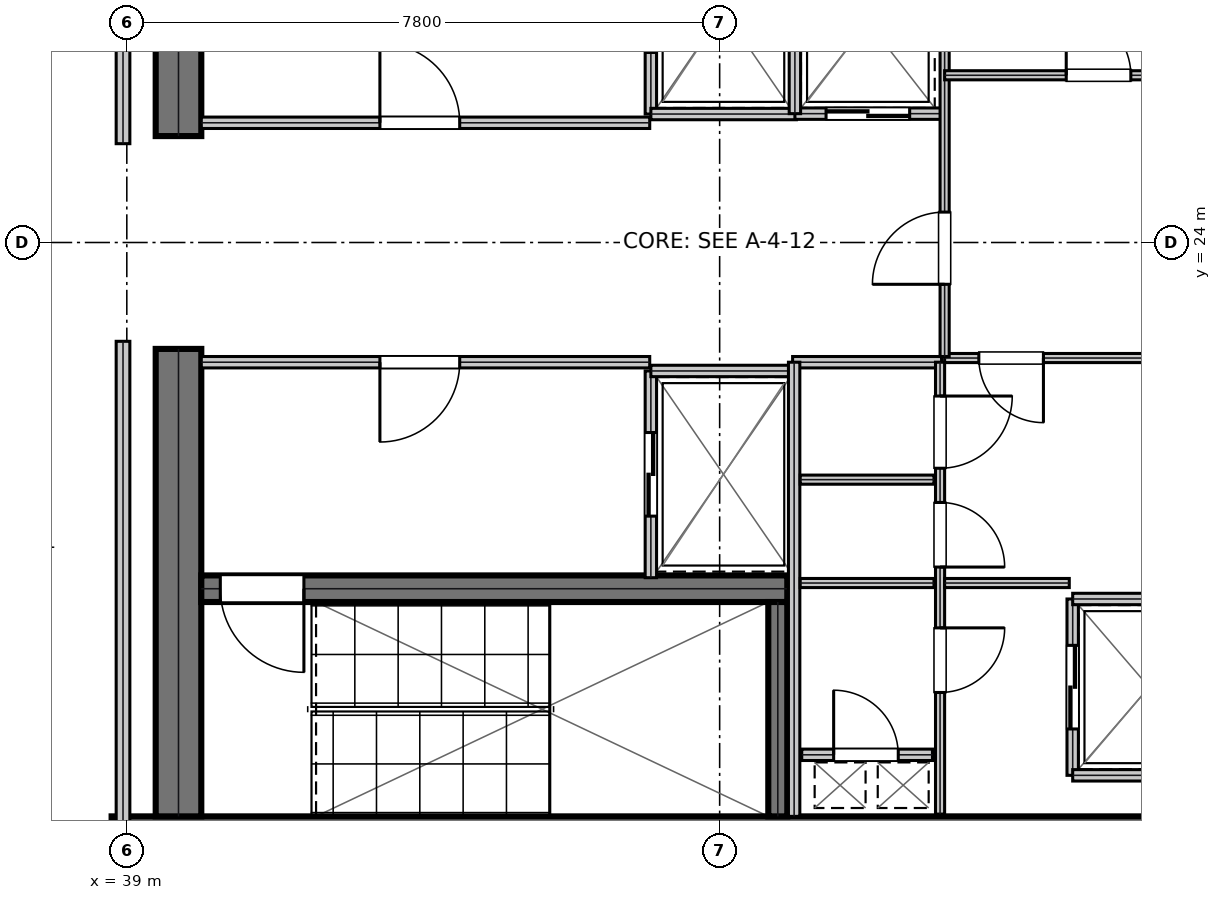
"""IFC4 building model, lengths in metres.
Left out: names, types, materials, properties, quantities, classifications, styles, units other than length and angle.
Written with IfcOpenShell. Run it as: python <this file> out.ifc"""

import sys

from ifc_helpers import new_model, si_unit, direction, frame, frame_2d, origin, place, context, subcontext, project, spatial, rectangle, extrude, element, fill, save


model = new_model("IFC4")
c1 = context("Model", 3, precision=1e-05, world=origin(), true_north=direction((0.0, 1.0)))
c2 = subcontext(c1, "Body", "Model", "MODEL_VIEW")
j1 = project(units=[si_unit("LENGTHUNIT", "METRE"), si_unit("PLANEANGLEUNIT", "RADIAN")], contexts=[c1])
p1 = place(None, origin())
s1 = spatial("IfcSite", under=j1, at=p1, CompositionType="ELEMENT")
p2 = place(p1, origin())
s2 = spatial("IfcBuilding", under=s1, at=p2, CompositionType="ELEMENT")
p3 = place(p2, frame((0.0, 0.0, 295.2)))
s3 = spatial("IfcBuildingStorey", under=s2, at=p3, CompositionType="ELEMENT", Elevation=295.2)
p4 = place(p3, frame((38.8, 16.15, 0.0), z_axis=(0.0, 0.0, 1.0), x_axis=(1.0, 0.0, 0.0)))
e1 = element("IfcWall", 1, at=p4, inside=s3, PredefinedType="SHEAR", context=c2, shape_type="SweptSolid", body=[
    extrude(rectangle(XDim=16.0, YDim=0.6, at=frame_2d((8.0, 0.0))), origin(), (0.0, 0.0, 1.0), 3.81),
])
for number, where, z_axis, x_axis in (
    (2, (39.68, 16.45, 0.0), (0.0, 0.0, 1.0), (0.0, 1.0, 0.0)),
    (3, (39.68, 25.4, 0.0), (0.0, 0.0, 1.0), (0.0, 1.0, 0.0)),
):
    element("IfcWall", number, at=place(p3, frame(where, z_axis=z_axis, x_axis=x_axis)), inside=s3, PredefinedType="SHEAR", context=c2, shape_type="SweptSolid", body=[
        extrude(rectangle(XDim=6.15, YDim=0.6, at=frame_2d((3.075, 0.0))), origin(), (0.0, 0.0, 1.0), 3.81),
    ])
p5 = place(p3, frame((39.98, 19.445, 0.0), z_axis=(0.0, 0.0, 1.0), x_axis=(1.0, 0.0, 0.0)))
e4 = element("IfcWall", 4, at=p5, inside=s3, PredefinedType="SHEAR", context=c2, shape_type="SweptSolid", body=[
    extrude(rectangle(XDim=7.71, YDim=0.35, at=frame_2d((3.855, 0.0))), origin(), (0.0, 0.0, 1.0), 3.81),
])
p6 = place(p5, frame((0.25, 0.0, 0.0)))
e5 = element("IfcOpeningElement", 5, at=p6, cuts=e4, PredefinedType="OPENING", context=c2, shape_type="SweptSolid", body=[
    extrude(rectangle(XDim=1.1, YDim=2.15, at=frame_2d((0.55, 1.075))), frame((0.0, 0.185, 0.0), z_axis=(0.0, -1.0, 0.0), x_axis=(1.0, 0.0, 0.0)), (0.0, 0.0, 1.0), 0.37),
])
p7 = place(p3, frame((47.565, 16.45, 0.0), z_axis=(0.0, 0.0, 1.0), x_axis=(0.0, 1.0, 0.0)))
e6 = element("IfcWall", 6, at=p7, inside=s3, PredefinedType="SHEAR", context=c2, shape_type="SweptSolid", body=[
    extrude(rectangle(XDim=2.82, YDim=0.25, at=frame_2d((1.41, 0.0))), origin(), (0.0, 0.0, 1.0), 3.81),
])
p8 = place(p3, frame((39.98, 25.575, 0.0), z_axis=(0.0, 0.0, 1.0), x_axis=(1.0, 0.0, 0.0)))
e7 = element("IfcWall", 7, at=p8, inside=s3, PredefinedType="PARTITIONING", context=c2, shape_type="SweptSolid", body=[
    extrude(rectangle(XDim=5.9, YDim=0.15, at=frame_2d((2.95, 0.0))), origin(), (0.0, 0.0, 1.0), 3.81),
])
p9 = place(p8, frame((2.35, 0.0, 0.0)))
e8 = element("IfcOpeningElement", 8, at=p9, cuts=e7, PredefinedType="OPENING", context=c2, shape_type="SweptSolid", body=[
    extrude(rectangle(XDim=1.05, YDim=2.15, at=frame_2d((0.525, 1.075))), frame((0.0, 0.085, 0.0), z_axis=(0.0, -1.0, 0.0), x_axis=(1.0, 0.0, 0.0)), (0.0, 0.0, 1.0), 0.17),
])
p10 = place(p3, frame((39.98, 22.425, 0.0), z_axis=(0.0, 0.0, 1.0), x_axis=(1.0, 0.0, 0.0)))
e9 = element("IfcWall", 9, at=p10, inside=s3, PredefinedType="PARTITIONING", context=c2, shape_type="SweptSolid", body=[
    extrude(rectangle(XDim=5.9, YDim=0.15, at=frame_2d((2.95, 0.0))), origin(), (0.0, 0.0, 1.0), 3.81),
])
p11 = place(p10, frame((2.35, 0.0, 0.0)))
e10 = element("IfcOpeningElement", 10, at=p11, cuts=e9, PredefinedType="OPENING", context=c2, shape_type="SweptSolid", body=[
    extrude(rectangle(XDim=1.05, YDim=2.15, at=frame_2d((0.525, 1.075))), frame((0.0, 0.085, 0.0), z_axis=(0.0, -1.0, 0.0), x_axis=(1.0, 0.0, 0.0)), (0.0, 0.0, 1.0), 0.17),
])
p12 = place(p3, frame((45.895, 25.69, 0.0), z_axis=(0.0, 0.0, 1.0), x_axis=(0.0, 1.0, 0.0)))
e11 = element("IfcWall", 11, at=p12, inside=s3, PredefinedType="PARTITIONING", context=c2, shape_type="SweptSolid", body=[
    extrude(rectangle(XDim=2.72, YDim=0.15, at=frame_2d((1.36, 0.0))), origin(), (0.0, 0.0, 1.0), 3.81),
])
p13 = place(p12, frame((0.81, 0.0, 0.0)))
e12 = element("IfcOpeningElement", 12, at=p13, cuts=e11, PredefinedType="OPENING", context=c2, shape_type="SweptSolid", body=[
    extrude(rectangle(XDim=1.1, YDim=2.15, at=frame_2d((0.55, 1.075))), frame((0.0, 0.085, 0.0), z_axis=(0.0, -1.0, 0.0), x_axis=(1.0, 0.0, 0.0)), (0.0, 0.0, 1.0), 0.17),
])
p14 = place(p3, frame((45.895, 25.69, 0.0), z_axis=(0.0, 0.0, 1.0), x_axis=(1.0, 0.0, 0.0)))
e13 = element("IfcWall", 13, at=p14, inside=s3, PredefinedType="PARTITIONING", context=c2, shape_type="SweptSolid", body=[
    extrude(rectangle(XDim=1.915, YDim=0.15, at=frame_2d((0.958, 0.0))), origin(), (0.0, 0.0, 1.0), 3.81),
])
p15 = place(p3, frame((45.895, 19.59, 0.0), z_axis=(0.0, 0.0, 1.0), x_axis=(0.0, 1.0, 0.0)))
e14 = element("IfcWall", 14, at=p15, inside=s3, PredefinedType="PARTITIONING", context=c2, shape_type="SweptSolid", body=[
    extrude(rectangle(XDim=2.72, YDim=0.15, at=frame_2d((1.36, 0.0))), origin(), (0.0, 0.0, 1.0), 3.81),
])
p16 = place(p15, frame((0.81, 0.0, 0.0)))
e15 = element("IfcOpeningElement", 15, at=p16, cuts=e14, PredefinedType="OPENING", context=c2, shape_type="SweptSolid", body=[
    extrude(rectangle(XDim=1.1, YDim=2.15, at=frame_2d((0.55, 1.075))), frame((0.0, 0.085, 0.0), z_axis=(0.0, -1.0, 0.0), x_axis=(1.0, 0.0, 0.0)), (0.0, 0.0, 1.0), 0.17),
])
p17 = place(p3, frame((45.895, 22.31, 0.0), z_axis=(0.0, 0.0, 1.0), x_axis=(1.0, 0.0, 0.0)))
e16 = element("IfcWall", 16, at=p17, inside=s3, PredefinedType="PARTITIONING", context=c2, shape_type="SweptSolid", body=[
    extrude(rectangle(XDim=1.915, YDim=0.15, at=frame_2d((0.958, 0.0))), origin(), (0.0, 0.0, 1.0), 3.81),
])
p18 = place(p3, frame((47.79, 25.695, 0.0), z_axis=(0.0, 0.0, 1.0), x_axis=(1.0, 0.0, 0.0)))
e17 = element("IfcWall", 17, at=p18, inside=s3, PredefinedType="PARTITIONING", context=c2, shape_type="SweptSolid", body=[
    extrude(rectangle(XDim=1.92, YDim=0.15, at=frame_2d((0.96, 0.0))), origin(), (0.0, 0.0, 1.0), 3.81),
])
p19 = place(p18, frame((0.41, 0.0, 0.0)))
e18 = element("IfcOpeningElement", 18, at=p19, cuts=e17, PredefinedType="OPENING", context=c2, shape_type="SweptSolid", body=[
    extrude(rectangle(XDim=1.1, YDim=2.15, at=frame_2d((0.55, 1.075))), frame((0.0, 0.085, 0.0), z_axis=(0.0, -1.0, 0.0), x_axis=(1.0, 0.0, 0.0)), (0.0, 0.0, 1.0), 0.17),
])
p20 = place(p3, frame((47.79, 25.695, 0.0), z_axis=(0.0, 0.0, 1.0), x_axis=(0.0, 1.0, 0.0)))
e19 = element("IfcWall", 19, at=p20, inside=s3, PredefinedType="PARTITIONING", context=c2, shape_type="SweptSolid", body=[
    extrude(rectangle(XDim=2.415, YDim=0.15, at=frame_2d((1.208, 0.0))), origin(), (0.0, 0.0, 1.0), 3.81),
])
p21 = place(p3, frame((51.445, 16.99, 0.0), z_axis=(0.0, 0.0, 1.0), x_axis=(0.0, 1.0, 0.0)))
e20 = element("IfcWall", 20, at=p21, inside=s3, PredefinedType="PARTITIONING", context=c2, shape_type="SweptSolid", body=[
    extrude(rectangle(XDim=2.32, YDim=0.15, at=frame_2d((1.16, 0.0))), origin(), (0.0, 0.0, 1.0), 3.81),
])
p22 = place(p21, frame((0.61, 0.0, 0.0)))
e21 = element("IfcOpeningElement", 21, at=p22, cuts=e20, PredefinedType="OPENING", context=c2, shape_type="SweptSolid", body=[
    extrude(rectangle(XDim=1.1, YDim=2.15, at=frame_2d((0.55, 1.075))), frame((0.0, 0.085, 0.0), z_axis=(0.0, -1.0, 0.0), x_axis=(1.0, 0.0, 0.0)), (0.0, 0.0, 1.0), 0.17),
])
for number, where, z_axis, x_axis in (
    (22, (51.445, 16.99, 0.0), (0.0, 0.0, 1.0), (1.0, 0.0, 0.0)),
    (23, (51.445, 19.31, 0.0), (0.0, 0.0, 1.0), (1.0, 0.0, 0.0)),
):
    element("IfcWall", number, at=place(p3, frame(where, z_axis=z_axis, x_axis=x_axis)), inside=s3, PredefinedType="PARTITIONING", context=c2, shape_type="SweptSolid", body=[
        extrude(rectangle(XDim=2.015, YDim=0.15, at=frame_2d((1.007, 0.0))), origin(), (0.0, 0.0, 1.0), 3.81),
    ])
p23 = place(p3, frame((47.88, 17.26, 0.0), z_axis=(0.0, 0.0, 1.0), x_axis=(1.0, 0.0, 0.0)))
e24 = element("IfcWall", 24, at=p23, inside=s3, PredefinedType="PARTITIONING", context=c2, shape_type="SweptSolid", body=[
    extrude(rectangle(XDim=1.72, YDim=0.15, at=frame_2d((0.86, 0.0))), origin(), (0.0, 0.0, 1.0), 3.81),
])
p24 = place(p23, frame((0.42, 0.0, 0.0)))
e25 = element("IfcOpeningElement", 25, at=p24, cuts=e24, PredefinedType="OPENING", context=c2, shape_type="SweptSolid", body=[
    extrude(rectangle(XDim=0.85, YDim=2.15, at=frame_2d((0.425, 1.075))), frame((0.0, 0.085, 0.0), z_axis=(0.0, -1.0, 0.0), x_axis=(1.0, 0.0, 0.0)), (0.0, 0.0, 1.0), 0.17),
])
p25 = place(p3, frame((47.76, 22.425, 0.0), z_axis=(0.0, 0.0, 1.0), x_axis=(1.0, 0.0, 0.0)))
e26 = element("IfcWall", 26, at=p25, inside=s3, PredefinedType="PARTITIONING", context=c2, shape_type="SweptSolid", body=[
    extrude(rectangle(XDim=1.96, YDim=0.15, at=frame_2d((0.98, 0.0))), origin(), (0.0, 0.0, 1.0), 3.81),
])
p26 = place(p3, frame((47.78, 16.45, 0.0), z_axis=(0.0, 0.0, 1.0), x_axis=(0.0, 1.0, 0.0)))
e27 = element("IfcWall", 27, at=p26, inside=s3, PredefinedType="PARTITIONING", context=c2, shape_type="SweptSolid", body=[
    extrude(rectangle(XDim=5.975, YDim=0.15, at=frame_2d((2.988, 0.0))), origin(), (0.0, 0.0, 1.0), 3.81),
])
for number, where, z_axis, x_axis in (
    (28, (47.86, 19.52, 0.0), (0.0, 0.0, 1.0), (1.0, 0.0, 0.0)),
    (29, (47.86, 20.88, 0.0), (0.0, 0.0, 1.0), (1.0, 0.0, 0.0)),
):
    element("IfcWall", number, at=place(p3, frame(where, z_axis=z_axis, x_axis=x_axis)), inside=s3, PredefinedType="PARTITIONING", context=c2, shape_type="SweptSolid", body=[
        extrude(rectangle(XDim=1.76, YDim=0.12, at=frame_2d((0.88, 0.0))), origin(), (0.0, 0.0, 1.0), 3.81),
    ])
p27 = place(p3, frame((49.7, 16.48, 0.0), z_axis=(0.0, 0.0, 1.0), x_axis=(0.0, 1.0, 0.0)))
e30 = element("IfcWall", 30, at=p27, inside=s3, PredefinedType="PARTITIONING", context=c2, shape_type="SweptSolid", body=[
    extrude(rectangle(XDim=5.945, YDim=0.12, at=frame_2d((2.973, 0.0))), origin(), (0.0, 0.0, 1.0), 3.81),
])
p28 = place(p27, frame((1.6, 0.0, 0.0)))
e31 = element("IfcOpeningElement", 31, at=p28, cuts=e30, PredefinedType="OPENING", context=c2, shape_type="SweptSolid", body=[
    extrude(rectangle(XDim=0.85, YDim=2.15, at=frame_2d((0.425, 1.075))), frame((0.0, 0.07, 0.0), z_axis=(0.0, -1.0, 0.0), x_axis=(1.0, 0.0, 0.0)), (0.0, 0.0, 1.0), 0.14),
])
p29 = place(p27, frame((3.25, 0.0, 0.0)))
e32 = element("IfcOpeningElement", 32, at=p29, cuts=e30, PredefinedType="OPENING", context=c2, shape_type="SweptSolid", body=[
    extrude(rectangle(XDim=0.85, YDim=2.15, at=frame_2d((0.425, 1.075))), frame((0.0, 0.07, 0.0), z_axis=(0.0, -1.0, 0.0), x_axis=(1.0, 0.0, 0.0)), (0.0, 0.0, 1.0), 0.14),
])
p30 = place(p27, frame((4.55, 0.0, 0.0)))
e33 = element("IfcOpeningElement", 33, at=p30, cuts=e30, PredefinedType="OPENING", context=c2, shape_type="SweptSolid", body=[
    extrude(rectangle(XDim=0.95, YDim=2.15, at=frame_2d((0.475, 1.075))), frame((0.0, 0.07, 0.0), z_axis=(0.0, -1.0, 0.0), x_axis=(1.0, 0.0, 0.0)), (0.0, 0.0, 1.0), 0.14),
])
p31 = place(p3, frame((49.76, 22.48, 0.0), z_axis=(0.0, 0.0, 1.0), x_axis=(1.0, 0.0, 0.0)))
e34 = element("IfcWall", 34, at=p31, inside=s3, PredefinedType="PARTITIONING", context=c2, shape_type="SweptSolid", body=[
    extrude(rectangle(XDim=3.9, YDim=0.12, at=frame_2d((1.95, 0.0))), origin(), (0.0, 0.0, 1.0), 3.81),
])
p32 = place(p31, frame((0.45, 0.0, 0.0)))
e35 = element("IfcOpeningElement", 35, at=p32, cuts=e34, PredefinedType="OPENING", context=c2, shape_type="SweptSolid", body=[
    extrude(rectangle(XDim=0.85, YDim=2.15, at=frame_2d((0.425, 1.075))), frame((0.0, 0.07, 0.0), z_axis=(0.0, -1.0, 0.0), x_axis=(1.0, 0.0, 0.0)), (0.0, 0.0, 1.0), 0.14),
])
p33 = place(p3, frame((49.76, 19.52, 0.0), z_axis=(0.0, 0.0, 1.0), x_axis=(1.0, 0.0, 0.0)))
e36 = element("IfcWall", 36, at=p33, inside=s3, PredefinedType="PARTITIONING", context=c2, shape_type="SweptSolid", body=[
    extrude(rectangle(XDim=1.64, YDim=0.12, at=frame_2d((0.82, 0.0))), origin(), (0.0, 0.0, 1.0), 3.81),
])
p34 = place(p3, frame((49.76, 22.5, 0.0), z_axis=(0.0, 0.0, 1.0), x_axis=(0.0, 1.0, 0.0)))
e37 = element("IfcWall", 37, at=p34, inside=s3, PredefinedType="PARTITIONING", context=c2, shape_type="SweptSolid", body=[
    extrude(rectangle(XDim=5.72, YDim=0.12, at=frame_2d((2.86, 0.0))), origin(), (0.0, 0.0, 1.0), 3.81),
])
p35 = place(p34, frame((0.95, 0.0, 0.0)))
e38 = element("IfcOpeningElement", 38, at=p35, cuts=e37, PredefinedType="OPENING", context=c2, shape_type="SweptSolid", body=[
    extrude(rectangle(XDim=0.95, YDim=2.15, at=frame_2d((0.475, 1.075))), frame((0.0, 0.07, 0.0), z_axis=(0.0, -1.0, 0.0), x_axis=(1.0, 0.0, 0.0)), (0.0, 0.0, 1.0), 0.14),
])
p36 = place(p3, frame((49.76, 26.2, 0.0), z_axis=(0.0, 0.0, 1.0), x_axis=(1.0, 0.0, 0.0)))
e39 = element("IfcWall", 39, at=p36, inside=s3, PredefinedType="PARTITIONING", context=c2, shape_type="SweptSolid", body=[
    extrude(rectangle(XDim=3.9, YDim=0.12, at=frame_2d((1.95, 0.0))), origin(), (0.0, 0.0, 1.0), 3.81),
])
p37 = place(p36, frame((1.6, 0.0, 0.0)))
e40 = element("IfcOpeningElement", 40, at=p37, cuts=e39, PredefinedType="OPENING", context=c2, shape_type="SweptSolid", body=[
    extrude(rectangle(XDim=0.85, YDim=2.15, at=frame_2d((0.425, 1.075))), frame((0.0, 0.07, 0.0), z_axis=(0.0, -1.0, 0.0), x_axis=(1.0, 0.0, 0.0)), (0.0, 0.0, 1.0), 0.14),
])
for number, where, z_axis, x_axis in (
    (41, (38.95, 15.739, 0.0), (0.0, 0.0, 1.0), (0.0, 1.0, 0.0)),
    (42, (38.95, 25.3, 0.0), (0.0, 0.0, 1.0), (0.0, 1.0, 0.0)),
):
    element("IfcWall", number, at=place(p3, frame(where, z_axis=z_axis, x_axis=x_axis)), inside=s3, PredefinedType="SOLIDWALL", context=c2, shape_type="SweptSolid", body=[
        extrude(rectangle(XDim=6.961, YDim=0.18, at=frame_2d((3.48, 0.0))), origin(), (0.0, 0.0, 1.0), 3.27),
    ])
p38 = place(p9, origin())
e43 = element("IfcDoor", 43, at=p38, inside=s3, OperationType="SINGLE_SWING_LEFT", PredefinedType="DOOR", context=c2, shape_type="SweptSolid", body=[
    extrude(rectangle(XDim=1.05, YDim=2.15, at=frame_2d((0.525, 1.075))), frame((0.0, 0.025, 0.0), z_axis=(0.0, -1.0, 0.0), x_axis=(1.0, 0.0, 0.0)), (0.0, 0.0, 1.0), 0.05),
])
fill(e8, e43)
p39 = place(p11, frame((1.05, 0.0, 0.0), z_axis=(0.0, 0.0, 1.0), x_axis=(-1.0, 0.0, 0.0)))
e44 = element("IfcDoor", 44, at=p39, inside=s3, OperationType="SINGLE_SWING_RIGHT", PredefinedType="DOOR", context=c2, shape_type="SweptSolid", body=[
    extrude(rectangle(XDim=1.05, YDim=2.15, at=frame_2d((0.525, 1.075))), frame((0.0, 0.025, 0.0), z_axis=(0.0, -1.0, 0.0), x_axis=(1.0, 0.0, 0.0)), (0.0, 0.0, 1.0), 0.05),
])
fill(e10, e44)
p40 = place(p16, frame((1.1, 0.0, 0.0), z_axis=(0.0, 0.0, 1.0), x_axis=(-1.0, 0.0, 0.0)))
e45 = element("IfcDoor", 45, at=p40, inside=s3, OperationType="DOUBLE_DOOR_SLIDING", PredefinedType="DOOR", context=c2, shape_type="SweptSolid", body=[
    extrude(rectangle(XDim=1.1, YDim=2.15, at=frame_2d((0.55, 1.075))), frame((0.0, 0.025, 0.0), z_axis=(0.0, -1.0, 0.0), x_axis=(1.0, 0.0, 0.0)), (0.0, 0.0, 1.0), 0.05),
])
fill(e15, e45)
p41 = place(p19, frame((1.1, 0.0, 0.0), z_axis=(0.0, 0.0, 1.0), x_axis=(-1.0, 0.0, 0.0)))
e46 = element("IfcDoor", 46, at=p41, inside=s3, OperationType="DOUBLE_DOOR_SLIDING", PredefinedType="DOOR", context=c2, shape_type="SweptSolid", body=[
    extrude(rectangle(XDim=1.1, YDim=2.15, at=frame_2d((0.55, 1.075))), frame((0.0, 0.025, 0.0), z_axis=(0.0, -1.0, 0.0), x_axis=(1.0, 0.0, 0.0)), (0.0, 0.0, 1.0), 0.05),
])
fill(e18, e46)
p42 = place(p22, frame((1.1, 0.0, 0.0), z_axis=(0.0, 0.0, 1.0), x_axis=(-1.0, 0.0, 0.0)))
e47 = element("IfcDoor", 47, at=p42, inside=s3, OperationType="DOUBLE_DOOR_SLIDING", PredefinedType="DOOR", context=c2, shape_type="SweptSolid", body=[
    extrude(rectangle(XDim=1.1, YDim=2.15, at=frame_2d((0.55, 1.075))), frame((0.0, 0.025, 0.0), z_axis=(0.0, -1.0, 0.0), x_axis=(1.0, 0.0, 0.0)), (0.0, 0.0, 1.0), 0.05),
])
fill(e21, e47)
p43 = place(p24, origin())
e48 = element("IfcDoor", 48, at=p43, inside=s3, OperationType="SINGLE_SWING_LEFT", PredefinedType="TRAPDOOR", context=c2, shape_type="SweptSolid", body=[
    extrude(rectangle(XDim=0.85, YDim=2.15, at=frame_2d((0.425, 1.075))), frame((0.0, 0.025, 0.0), z_axis=(0.0, -1.0, 0.0), x_axis=(1.0, 0.0, 0.0)), (0.0, 0.0, 1.0), 0.05),
])
fill(e25, e48)
p44 = place(p28, frame((0.85, 0.0, 0.0), z_axis=(0.0, 0.0, 1.0), x_axis=(-1.0, 0.0, 0.0)))
e49 = element("IfcDoor", 49, at=p44, inside=s3, OperationType="SINGLE_SWING_LEFT", PredefinedType="DOOR", context=c2, shape_type="SweptSolid", body=[
    extrude(rectangle(XDim=0.85, YDim=2.15, at=frame_2d((0.425, 1.075))), frame((0.0, 0.025, 0.0), z_axis=(0.0, -1.0, 0.0), x_axis=(1.0, 0.0, 0.0)), (0.0, 0.0, 1.0), 0.05),
])
fill(e31, e49)
p45 = place(p29, frame((0.85, 0.0, 0.0), z_axis=(0.0, 0.0, 1.0), x_axis=(-1.0, 0.0, 0.0)))
e50 = element("IfcDoor", 50, at=p45, inside=s3, OperationType="SINGLE_SWING_RIGHT", PredefinedType="DOOR", context=c2, shape_type="SweptSolid", body=[
    extrude(rectangle(XDim=0.85, YDim=2.15, at=frame_2d((0.425, 1.075))), frame((0.0, 0.025, 0.0), z_axis=(0.0, -1.0, 0.0), x_axis=(1.0, 0.0, 0.0)), (0.0, 0.0, 1.0), 0.05),
])
fill(e32, e50)
p46 = place(p30, frame((0.95, 0.0, 0.0), z_axis=(0.0, 0.0, 1.0), x_axis=(-1.0, 0.0, 0.0)))
e51 = element("IfcDoor", 51, at=p46, inside=s3, OperationType="SINGLE_SWING_LEFT", PredefinedType="DOOR", context=c2, shape_type="SweptSolid", body=[
    extrude(rectangle(XDim=0.95, YDim=2.15, at=frame_2d((0.475, 1.075))), frame((0.0, 0.025, 0.0), z_axis=(0.0, -1.0, 0.0), x_axis=(1.0, 0.0, 0.0)), (0.0, 0.0, 1.0), 0.05),
])
fill(e33, e51)
p47 = place(p32, frame((0.85, 0.0, 0.0), z_axis=(0.0, 0.0, 1.0), x_axis=(-1.0, 0.0, 0.0)))
e52 = element("IfcDoor", 52, at=p47, inside=s3, OperationType="SINGLE_SWING_LEFT", PredefinedType="DOOR", context=c2, shape_type="SweptSolid", body=[
    extrude(rectangle(XDim=0.85, YDim=2.15, at=frame_2d((0.425, 1.075))), frame((0.0, 0.025, 0.0), z_axis=(0.0, -1.0, 0.0), x_axis=(1.0, 0.0, 0.0)), (0.0, 0.0, 1.0), 0.05),
])
fill(e35, e52)
p48 = place(p35, origin())
e53 = element("IfcDoor", 53, at=p48, inside=s3, OperationType="SINGLE_SWING_LEFT", PredefinedType="DOOR", context=c2, shape_type="SweptSolid", body=[
    extrude(rectangle(XDim=0.95, YDim=2.15, at=frame_2d((0.475, 1.075))), frame((0.0, 0.025, 0.0), z_axis=(0.0, -1.0, 0.0), x_axis=(1.0, 0.0, 0.0)), (0.0, 0.0, 1.0), 0.05),
])
fill(e38, e53)
p49 = place(p37, origin())
e54 = element("IfcDoor", 54, at=p49, inside=s3, OperationType="SINGLE_SWING_LEFT", PredefinedType="DOOR", context=c2, shape_type="SweptSolid", body=[
    extrude(rectangle(XDim=0.85, YDim=2.15, at=frame_2d((0.425, 1.075))), frame((0.0, 0.025, 0.0), z_axis=(0.0, -1.0, 0.0), x_axis=(1.0, 0.0, 0.0)), (0.0, 0.0, 1.0), 0.05),
])
fill(e40, e54)
p50 = place(p6, frame((1.1, 0.0, 0.0), z_axis=(0.0, 0.0, 1.0), x_axis=(-1.0, 0.0, 0.0)))
e55 = element("IfcDoor", 55, at=p50, inside=s3, OperationType="SINGLE_SWING_LEFT", PredefinedType="DOOR", context=c2, shape_type="SweptSolid", body=[
    extrude(rectangle(XDim=1.1, YDim=2.15, at=frame_2d((0.55, 1.075))), frame((0.0, 0.025, 0.0), z_axis=(0.0, -1.0, 0.0), x_axis=(1.0, 0.0, 0.0)), (0.0, 0.0, 1.0), 0.05),
])
fill(e5, e55)
save(model, sys.argv[1])
